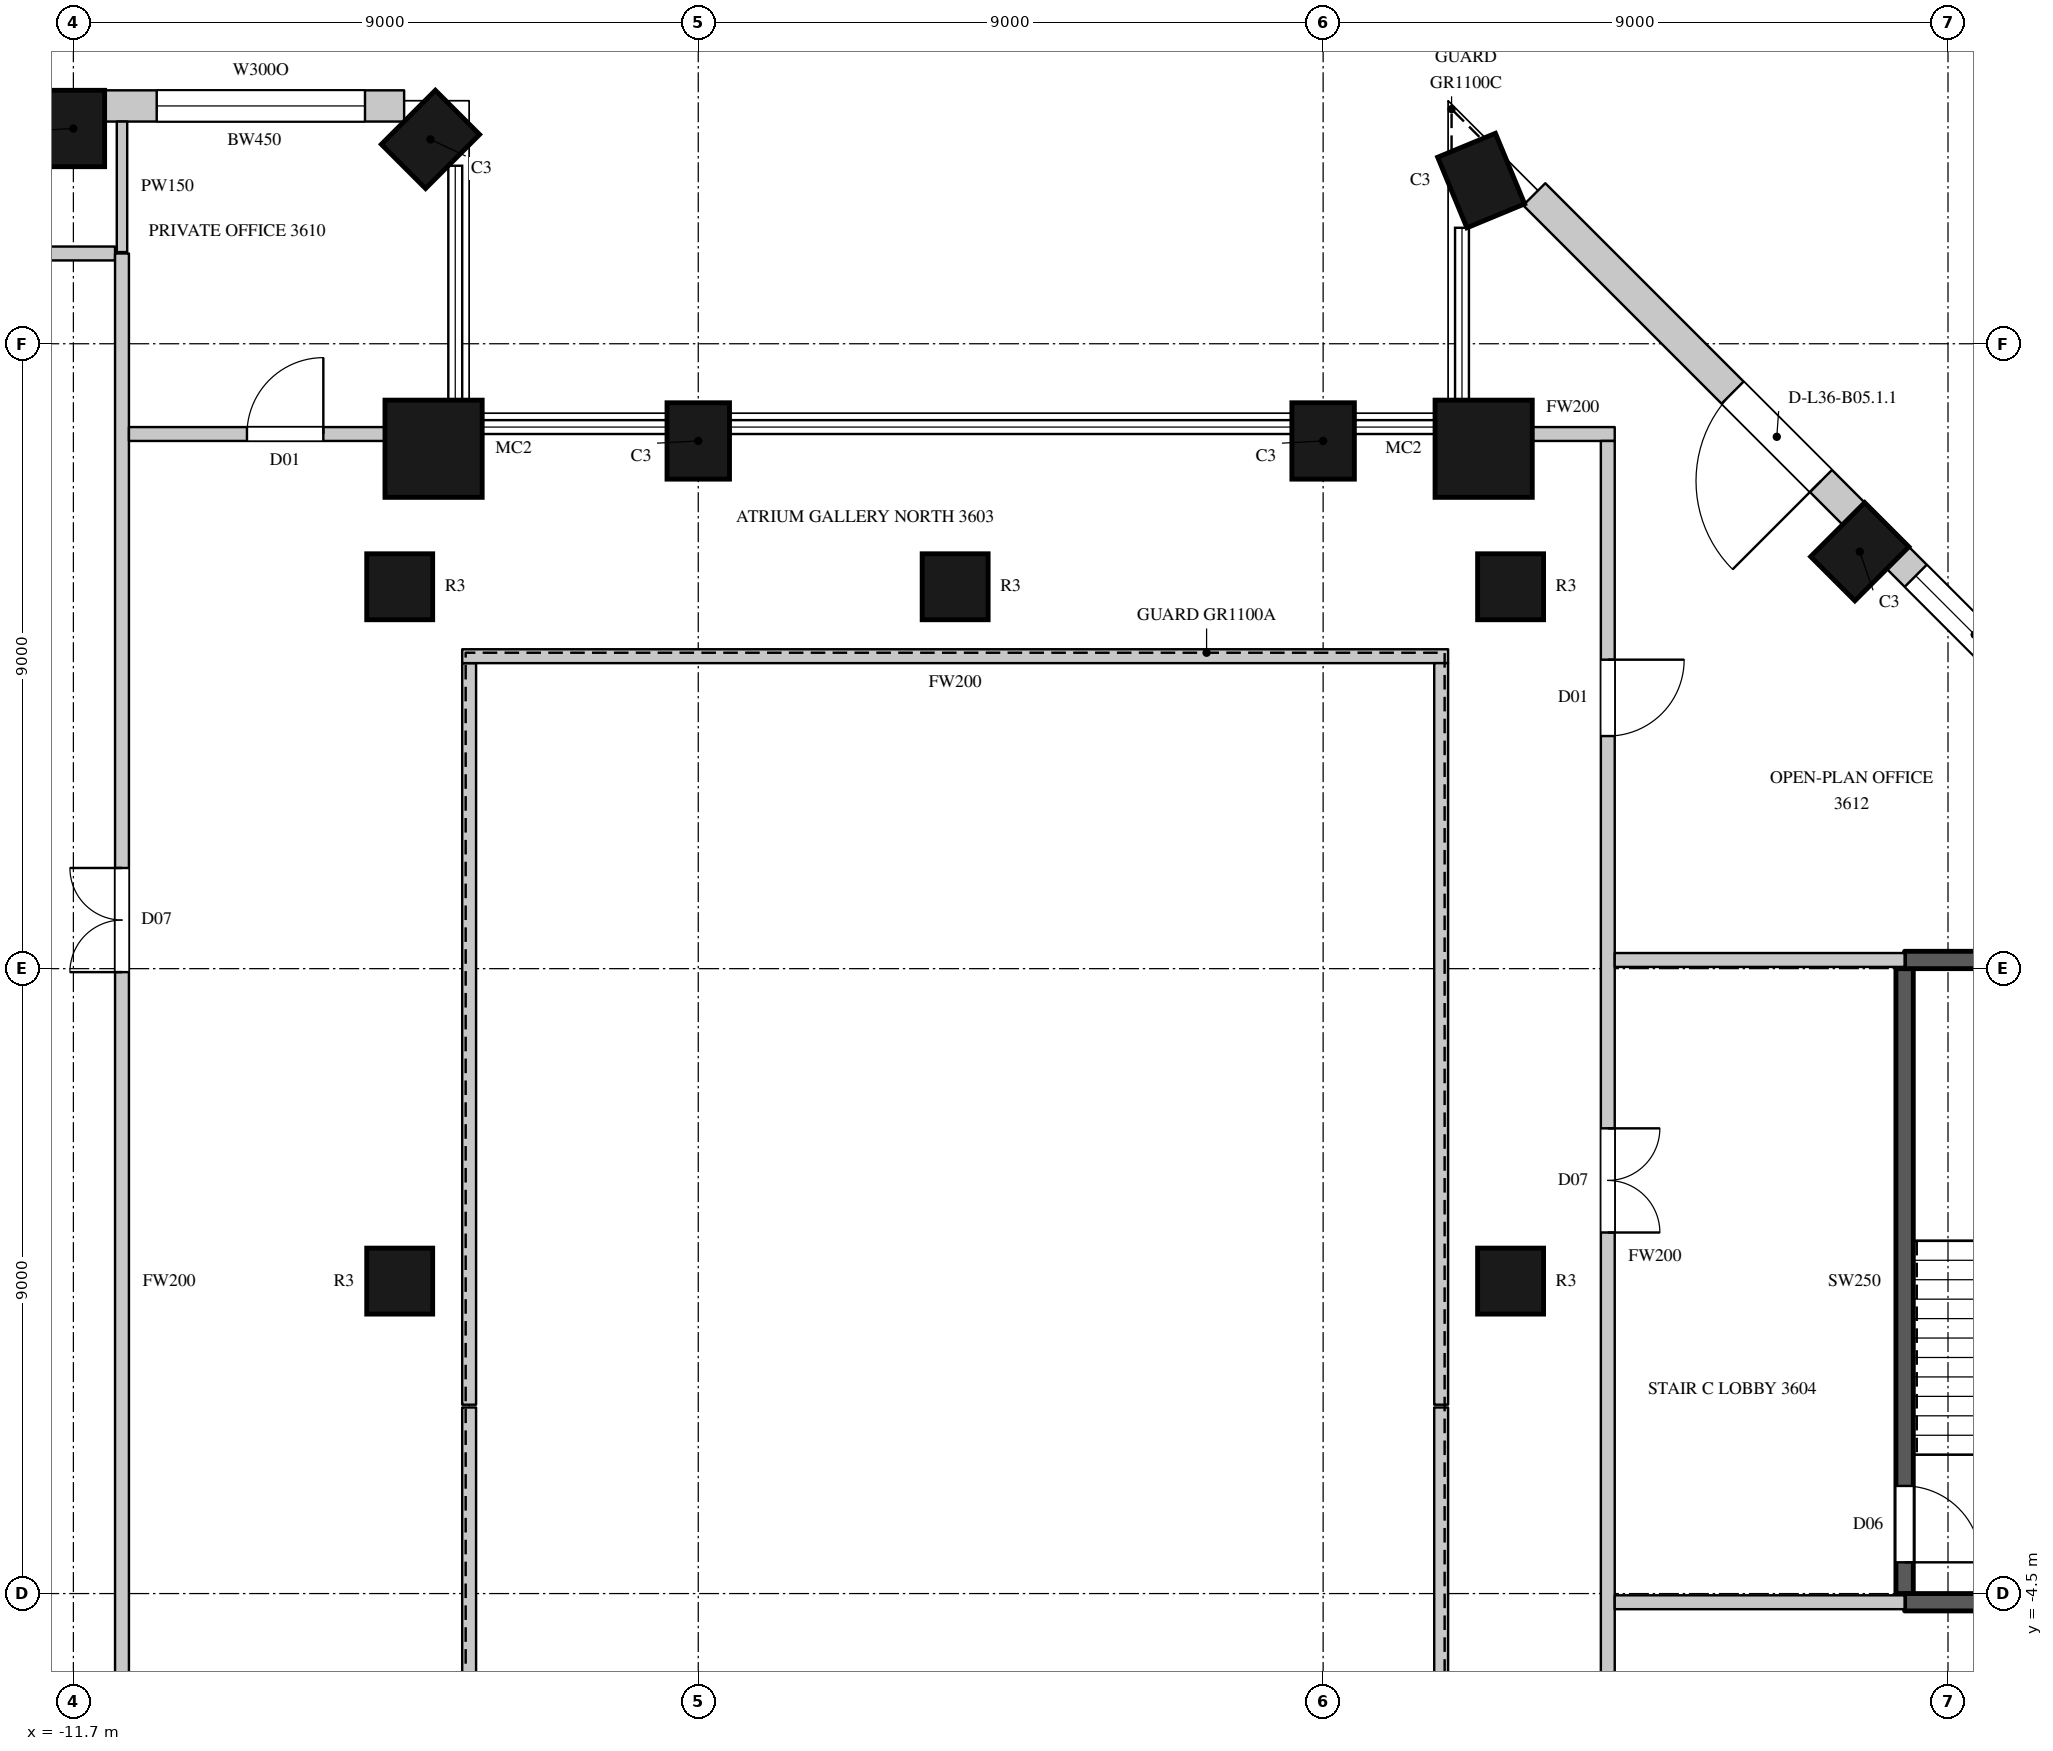
"""IFC4 building model, lengths in metres.
Left out: names, types, materials, properties, quantities, classifications, styles, units other than length and angle.
Written with IfcOpenShell. Run it as: python <this file> out.ifc"""

import sys

from ifc_helpers import new_model, si_unit, direction, frame, frame_2d, origin, origin_2d, place, context, subcontext, project, spatial, rectangle, circle, extrude, element, fill, save


model = new_model("IFC4")
c1 = context("Model", 3, precision=1e-05, world=origin(), true_north=direction((0.0, 1.0)))
c2 = subcontext(c1, "Body", "Model", "MODEL_VIEW")
j1 = project(units=[si_unit("LENGTHUNIT", "METRE"), si_unit("PLANEANGLEUNIT", "RADIAN")], contexts=[c1])
p1 = place(None, origin())
s1 = spatial("IfcSite", under=j1, at=p1, CompositionType="ELEMENT")
p2 = place(p1, origin())
s2 = spatial("IfcBuilding", under=s1, at=p2, CompositionType="ELEMENT")
p3 = place(p2, frame((0.0, 0.0, 168.7)))
s3 = spatial("IfcBuildingStorey", under=s2, at=p3, CompositionType="ELEMENT", Elevation=168.7)
for number, where, z_axis, x_axis in (
    (1, (14.029, 10.505, 0.0), (0.0, 0.0, 1.0), (-0.707, 0.707, 0.0)),
    (2, (8.576, 15.85, 0.0), (0.0, 0.0, 1.0), (-0.924, -0.383, 0.0)),
):
    element("IfcColumn", number, at=place(p3, frame(where, z_axis=z_axis, x_axis=x_axis)), inside=s3, PredefinedType="COLUMN", context=c2, shape_type="SweptSolid", body=[
        extrude(rectangle(XDim=0.9, YDim=1.1, at=origin_2d()), origin(), (0.0, 0.0, 1.0), 4.1),
    ])
p4 = place(p3, frame((8.612, 11.988, 0.0), z_axis=(0.0, 0.0, 1.0), x_axis=(1.0, 0.0, 0.0)))
e3 = element("IfcColumn", 3, at=p4, inside=s3, PredefinedType="COLUMN", context=c2, shape_type="SweptSolid", body=[
    extrude(circle(Radius=0.7, at=origin_2d()), origin(), (0.0, 0.0, 1.0), 4.1),
])
for number, where, z_axis, x_axis in (
    (4, (6.3, 12.1, 0.0), (0.0, 0.0, 1.0), (-1.0, 0.0, 0.0)),
    (5, (-2.7, 12.1, 0.0), (0.0, 0.0, 1.0), (-1.0, 0.0, 0.0)),
):
    element("IfcColumn", number, at=place(p3, frame(where, z_axis=z_axis, x_axis=x_axis)), inside=s3, PredefinedType="COLUMN", context=c2, shape_type="SweptSolid", body=[
        extrude(rectangle(XDim=0.9, YDim=1.1, at=origin_2d()), origin(), (0.0, 0.0, 1.0), 4.1),
    ])
p5 = place(p3, frame((-6.512, 11.988, 0.0), z_axis=(0.0, 0.0, 1.0), x_axis=(1.0, 0.0, 0.0)))
e6 = element("IfcColumn", 6, at=p5, inside=s3, PredefinedType="COLUMN", context=c2, shape_type="SweptSolid", body=[
    extrude(circle(Radius=0.7, at=origin_2d()), origin(), (0.0, 0.0, 1.0), 4.1),
])
for number, where, z_axis, x_axis in (
    (7, (-6.557, 16.443, 0.0), (0.0, 0.0, 1.0), (-0.707, 0.707, 0.0)),
    (8, (-11.7, 16.6, 0.0), (0.0, 0.0, 1.0), (-1.0, 0.0, 0.0)),
):
    element("IfcColumn", number, at=place(p3, frame(where, z_axis=z_axis, x_axis=x_axis)), inside=s3, PredefinedType="COLUMN", context=c2, shape_type="SweptSolid", body=[
        extrude(rectangle(XDim=0.9, YDim=1.1, at=origin_2d()), origin(), (0.0, 0.0, 1.0), 4.1),
    ])
for number, where, z_axis, x_axis in (
    (9, (-7.0, 0.0, 0.0), (0.0, 0.0, 1.0), (1.0, 0.0, 0.0)),
    (10, (-7.0, 10.0, 0.0), (0.0, 0.0, 1.0), (1.0, 0.0, 0.0)),
    (11, (1.0, 10.0, 0.0), (0.0, 0.0, 1.0), (1.0, 0.0, 0.0)),
    (12, (9.0, 0.0, 0.0), (0.0, 0.0, 1.0), (1.0, 0.0, 0.0)),
    (13, (9.0, 10.0, 0.0), (0.0, 0.0, 1.0), (1.0, 0.0, 0.0)),
):
    element("IfcColumn", number, at=place(p3, frame(where, z_axis=z_axis, x_axis=x_axis)), inside=s3, PredefinedType="COLUMN", context=c2, shape_type="SweptSolid", body=[
        extrude(circle(Radius=0.475, at=origin_2d()), origin(), (0.0, 0.0, 1.0), 4.1),
    ])
p6 = place(p3, frame((19.615, 5.379, 0.0), z_axis=(0.0, 0.0, 1.0), x_axis=(-0.707089646058, 0.7071239159, 0.0)))
e14 = element("IfcWall", 14, at=p6, inside=s3, PredefinedType="SOLIDWALL", context=c2, shape_type="SweptSolid", body=[
    extrude(rectangle(XDim=7.124, YDim=0.45, at=frame_2d((3.562, 0.0))), origin(), (0.0, 0.0, 1.0), 3.8),
])
p7 = place(p6, frame((0.328, 0.0, 1.05)))
e15 = element("IfcOpeningElement", 15, at=p7, cuts=e14, PredefinedType="OPENING", context=c2, shape_type="SweptSolid", body=[
    extrude(rectangle(XDim=2.4, YDim=2.4, at=frame_2d((1.2, 1.2))), frame((0.0, 0.235, 0.0), z_axis=(0.0, -1.0, 0.0), x_axis=(1.0, 0.0, 0.0)), (0.0, 0.0, 1.0), 0.47),
])
p8 = place(p6, frame((4.359, 0.0, 1.05)))
e16 = element("IfcOpeningElement", 16, at=p8, cuts=e14, PredefinedType="OPENING", context=c2, shape_type="SweptSolid", body=[
    extrude(rectangle(XDim=2.4, YDim=2.4, at=frame_2d((1.2, 1.2))), frame((0.0, 0.235, 0.0), z_axis=(0.0, -1.0, 0.0), x_axis=(1.0, 0.0, 0.0)), (0.0, 0.0, 1.0), 0.47),
])
p9 = place(p3, frame((13.941, 11.053, 0.0), z_axis=(0.0, 0.0, 1.0), x_axis=(-0.707106781187, 0.707106781187, 0.0)))
e17 = element("IfcWall", 17, at=p9, inside=s3, PredefinedType="SOLIDWALL", context=c2, shape_type="SweptSolid", body=[
    extrude(rectangle(XDim=6.505, YDim=0.45, at=frame_2d((3.252, 0.0))), origin(), (0.0, 0.0, 1.0), 3.8),
])
p10 = place(p9, frame((0.665, 0.0, 0.0)))
e18 = element("IfcOpeningElement", 18, at=p10, cuts=e17, PredefinedType="OPENING", context=c2, shape_type="SweptSolid", body=[
    extrude(rectangle(XDim=1.8, YDim=2.4, at=frame_2d((0.9, 1.2))), frame((0.0, 0.235, 0.0), z_axis=(0.0, -1.0, 0.0), x_axis=(1.0, 0.0, 0.0)), (0.0, 0.0, 1.0), 0.47),
])
p11 = place(p3, frame((-6.936, 16.925, 0.0), z_axis=(0.0, 0.0, 1.0), x_axis=(-1.0, 0.0, 0.0)))
e19 = element("IfcWall", 19, at=p11, inside=s3, PredefinedType="SOLIDWALL", context=c2, shape_type="SweptSolid", body=[
    extrude(rectangle(XDim=4.314, YDim=0.45, at=frame_2d((2.157, 0.0))), origin(), (0.0, 0.0, 1.0), 3.8),
])
p12 = place(p11, frame((0.564, 0.0, 1.05)))
e20 = element("IfcOpeningElement", 20, at=p12, cuts=e19, PredefinedType="OPENING", context=c2, shape_type="SweptSolid", body=[
    extrude(rectangle(XDim=3.0, YDim=2.4, at=frame_2d((1.5, 1.2))), frame((0.0, 0.235, 0.0), z_axis=(0.0, -1.0, 0.0), x_axis=(1.0, 0.0, 0.0)), (0.0, 0.0, 1.0), 0.47),
])
p13 = place(p3, frame((16.206, 10.308, 0.0), z_axis=(0.0, 0.0, 1.0), x_axis=(-0.707057827829, 0.707155731156, 0.0)))
e21 = element("IfcWall", 21, at=p13, inside=s3, PredefinedType="SOLIDWALL", context=c2, shape_type="SweptSolid", body=[
    extrude(rectangle(XDim=2.494, YDim=0.45, at=frame_2d((1.247, 0.0))), origin(), (0.0, 0.0, 1.0), 0.6),
])
p14 = place(p3, frame((12.251, 14.263, 0.0), z_axis=(0.0, 0.0, 1.0), x_axis=(-0.707039709166, 0.707173846846, 0.0)))
e22 = element("IfcWall", 22, at=p14, inside=s3, PredefinedType="SOLIDWALL", context=c2, shape_type="SweptSolid", body=[
    extrude(rectangle(XDim=1.82, YDim=0.45, at=frame_2d((0.91, 0.0))), origin(), (0.0, 0.0, 1.0), 0.6),
])
p15 = place(p3, frame((-13.97, 14.8, 0.0), z_axis=(0.0, 0.0, 1.0), x_axis=(1.0, 0.0, 0.0)))
e23 = element("IfcWall", 23, at=p15, inside=s3, PredefinedType="PARTITIONING", context=c2, shape_type="SweptSolid", body=[
    extrude(rectangle(XDim=2.87, YDim=0.2, at=frame_2d((1.435, 0.0))), origin(), (0.0, 0.0, 1.0), 3.8),
])
p16 = place(p3, frame((-11.0, -14.8, 0.0), z_axis=(0.0, 0.0, 1.0), x_axis=(0.0, 1.0, 0.0)))
e24 = element("IfcWall", 24, at=p16, inside=s3, PredefinedType="PARTITIONING", context=c2, shape_type="SweptSolid", body=[
    extrude(rectangle(XDim=29.6, YDim=0.2, at=frame_2d((14.8, 0.0))), origin(), (0.0, 0.0, 1.0), 3.8),
])
p17 = place(p16, frame((19.25, 0.0, 0.0)))
e25 = element("IfcOpeningElement", 25, at=p17, cuts=e24, PredefinedType="OPENING", context=c2, shape_type="SweptSolid", body=[
    extrude(rectangle(XDim=1.5, YDim=2.4, at=frame_2d((0.75, 1.2))), frame((0.0, 0.11, 0.0), z_axis=(0.0, -1.0, 0.0), x_axis=(1.0, 0.0, 0.0)), (0.0, 0.0, 1.0), 0.22),
])
p18 = place(p3, frame((-10.9, 12.2, 0.0), z_axis=(0.0, 0.0, 1.0), x_axis=(1.0, 0.0, 0.0)))
e26 = element("IfcWall", 26, at=p18, inside=s3, PredefinedType="PARTITIONING", context=c2, shape_type="SweptSolid", body=[
    extrude(rectangle(XDim=3.704, YDim=0.2, at=frame_2d((1.852, 0.0))), origin(), (0.0, 0.0, 1.0), 3.8),
])
p19 = place(p18, frame((1.7, 0.0, 0.0)))
e27 = element("IfcOpeningElement", 27, at=p19, cuts=e26, PredefinedType="OPENING", context=c2, shape_type="SweptSolid", body=[
    extrude(rectangle(XDim=1.1, YDim=2.4, at=frame_2d((0.55, 1.2))), frame((0.0, 0.11, 0.0), z_axis=(0.0, -1.0, 0.0), x_axis=(1.0, 0.0, 0.0)), (0.0, 0.0, 1.0), 0.22),
])
p20 = place(p3, frame((-6.0, -8.9, 0.0), z_axis=(0.0, 0.0, 1.0), x_axis=(0.0, 1.0, 0.0)))
e28 = element("IfcWall", 28, at=p20, inside=s3, PredefinedType="PARTITIONING", context=c2, shape_type="SweptSolid", body=[
    extrude(rectangle(XDim=7.08, YDim=0.2, at=frame_2d((3.54, 0.0))), origin(), (0.0, 0.0, 1.0), 3.8),
])
p21 = place(p3, frame((-6.0, -1.78, 0.0), z_axis=(0.0, 0.0, 1.0), x_axis=(0.0, 1.0, 0.0)))
e29 = element("IfcWall", 29, at=p21, inside=s3, PredefinedType="PARTITIONING", context=c2, shape_type="SweptSolid", body=[
    extrude(rectangle(XDim=10.68, YDim=0.2, at=frame_2d((5.34, 0.0))), origin(), (0.0, 0.0, 1.0), 3.8),
])
p22 = place(p3, frame((-6.1, 9.0, 0.0), z_axis=(0.0, 0.0, 1.0), x_axis=(1.0, 0.0, 0.0)))
e30 = element("IfcWall", 30, at=p22, inside=s3, PredefinedType="PARTITIONING", context=c2, shape_type="SweptSolid", body=[
    extrude(rectangle(XDim=14.2, YDim=0.2, at=frame_2d((7.1, 0.0))), origin(), (0.0, 0.0, 1.0), 3.8),
])
p23 = place(p3, frame((8.0, -8.9, 0.0), z_axis=(0.0, 0.0, 1.0), x_axis=(0.0, 1.0, 0.0)))
e31 = element("IfcWall", 31, at=p23, inside=s3, PredefinedType="PARTITIONING", context=c2, shape_type="SweptSolid", body=[
    extrude(rectangle(XDim=7.08, YDim=0.2, at=frame_2d((3.54, 0.0))), origin(), (0.0, 0.0, 1.0), 3.8),
])
p24 = place(p3, frame((8.0, -1.78, 0.0), z_axis=(0.0, 0.0, 1.0), x_axis=(0.0, 1.0, 0.0)))
e32 = element("IfcWall", 32, at=p24, inside=s3, PredefinedType="PARTITIONING", context=c2, shape_type="SweptSolid", body=[
    extrude(rectangle(XDim=10.68, YDim=0.2, at=frame_2d((5.34, 0.0))), origin(), (0.0, 0.0, 1.0), 3.8),
])
p25 = place(p3, frame((9.296, 12.2, 0.0), z_axis=(0.0, 0.0, 1.0), x_axis=(1.0, 0.0, 0.0)))
e33 = element("IfcWall", 33, at=p25, inside=s3, PredefinedType="PARTITIONING", context=c2, shape_type="SweptSolid", body=[
    extrude(rectangle(XDim=1.204, YDim=0.2, at=frame_2d((0.602, 0.0))), origin(), (0.0, 0.0, 1.0), 3.8),
])
p26 = place(p3, frame((10.4, -11.4, 0.0), z_axis=(0.0, 0.0, 1.0), x_axis=(0.0, 1.0, 0.0)))
e34 = element("IfcWall", 34, at=p26, inside=s3, PredefinedType="PARTITIONING", context=c2, shape_type="SweptSolid", body=[
    extrude(rectangle(XDim=23.5, YDim=0.2, at=frame_2d((11.75, 0.0))), origin(), (0.0, 0.0, 1.0), 3.8),
])
p27 = place(p26, frame((12.1, 0.0, 0.0)))
e35 = element("IfcOpeningElement", 35, at=p27, cuts=e34, PredefinedType="OPENING", context=c2, shape_type="SweptSolid", body=[
    extrude(rectangle(XDim=1.5, YDim=2.4, at=frame_2d((0.75, 1.2))), frame((0.0, 0.11, 0.0), z_axis=(0.0, -1.0, 0.0), x_axis=(1.0, 0.0, 0.0)), (0.0, 0.0, 1.0), 0.22),
])
p28 = place(p26, frame((19.25, 0.0, 0.0)))
e36 = element("IfcOpeningElement", 36, at=p28, cuts=e34, PredefinedType="OPENING", context=c2, shape_type="SweptSolid", body=[
    extrude(rectangle(XDim=1.1, YDim=2.4, at=frame_2d((0.55, 1.2))), frame((0.0, 0.11, 0.0), z_axis=(0.0, -1.0, 0.0), x_axis=(1.0, 0.0, 0.0)), (0.0, 0.0, 1.0), 0.22),
])
p29 = place(p26, frame((4.45, 0.0, 0.0)))
e37 = element("IfcOpeningElement", 37, at=p29, cuts=e34, PredefinedType="OPENING", context=c2, shape_type="SweptSolid", body=[
    extrude(rectangle(XDim=1.1, YDim=2.4, at=frame_2d((0.55, 1.2))), frame((0.0, 0.11, 0.0), z_axis=(0.0, -1.0, 0.0), x_axis=(1.0, 0.0, 0.0)), (0.0, 0.0, 1.0), 0.22),
])
for number, where, z_axis, x_axis in (
    (38, (10.5, -4.625, 0.0), (0.0, 0.0, 1.0), (1.0, 0.0, 0.0)),
    (39, (10.5, 4.625, 0.0), (0.0, 0.0, 1.0), (1.0, 0.0, 0.0)),
):
    element("IfcWall", number, at=place(p3, frame(where, z_axis=z_axis, x_axis=x_axis)), inside=s3, PredefinedType="PARTITIONING", context=c2, shape_type="SweptSolid", body=[
        extrude(rectangle(XDim=4.175, YDim=0.2, at=frame_2d((2.087, 0.0))), origin(), (0.0, 0.0, 1.0), 3.8),
    ])
p30 = place(p3, frame((-11.0, 14.82, 0.0), z_axis=(0.0, 0.0, 1.0), x_axis=(0.0, 1.0, 0.0)))
e40 = element("IfcWall", 40, at=p30, inside=s3, PredefinedType="PARTITIONING", context=c2, shape_type="SweptSolid", body=[
    extrude(rectangle(XDim=1.88, YDim=0.15, at=frame_2d((0.94, 0.0))), origin(), (0.0, 0.0, 1.0), 3.8),
])
p31 = place(p3, frame((14.675, -4.5, 0.0), z_axis=(0.0, 0.0, 1.0), x_axis=(0.0, 1.0, 0.0)))
e41 = element("IfcWall", 41, at=p31, inside=s3, PredefinedType="SHEAR", context=c2, shape_type="SweptSolid", body=[
    extrude(rectangle(XDim=9.0, YDim=0.25, at=frame_2d((4.5, 0.0))), origin(), (0.0, 0.0, 1.0), 3.8),
])
p32 = place(p31, frame((0.45, 0.0, 0.0)))
e42 = element("IfcOpeningElement", 42, at=p32, cuts=e41, PredefinedType="OPENING", context=c2, shape_type="SweptSolid", body=[
    extrude(rectangle(XDim=1.1, YDim=2.2, at=frame_2d((0.55, 1.1))), frame((0.0, 0.135, 0.0), z_axis=(0.0, -1.0, 0.0), x_axis=(1.0, 0.0, 0.0)), (0.0, 0.0, 1.0), 0.27),
])
p33 = place(p3, frame((14.675, -4.625, 0.0), z_axis=(0.0, 0.0, 1.0), x_axis=(1.0, 0.0, 0.0)))
e43 = element("IfcWall", 43, at=p33, inside=s3, PredefinedType="SHEAR", context=c2, shape_type="SweptSolid", body=[
    extrude(rectangle(XDim=4.45, YDim=0.25, at=frame_2d((2.225, 0.0))), origin(), (0.0, 0.0, 1.0), 3.8),
])
p34 = place(p3, frame((14.675, 4.625, 0.0), z_axis=(0.0, 0.0, 1.0), x_axis=(1.0, 0.0, 0.0)))
e44 = element("IfcWall", 44, at=p34, inside=s3, PredefinedType="SHEAR", context=c2, shape_type="SweptSolid", body=[
    extrude(rectangle(XDim=4.324, YDim=0.25, at=frame_2d((2.162, 0.0))), origin(), (0.0, 0.0, 1.0), 3.8),
])
p35 = place(p8, origin())
e45 = element("IfcWindow", 45, at=p35, inside=s3, PartitioningType="SINGLE_PANEL", PredefinedType="WINDOW", context=c2, shape_type="SweptSolid", body=[
    extrude(rectangle(XDim=2.4, YDim=2.4, at=frame_2d((1.2, 1.2))), frame((0.0, 0.135, 0.0), z_axis=(0.0, -1.0, 0.0), x_axis=(1.0, 0.0, 0.0)), (0.0, 0.0, 1.0), 0.06),
])
fill(e16, e45)
p36 = place(p10, origin())
e46 = element("IfcDoor", 46, at=p36, inside=s3, OperationType="SLIDING_TO_LEFT", PredefinedType="DOOR", context=c2, shape_type="SweptSolid", body=[
    extrude(rectangle(XDim=1.8, YDim=2.4, at=frame_2d((0.9, 1.2))), frame((0.0, 0.13, 0.0), z_axis=(0.0, -1.0, 0.0), x_axis=(1.0, 0.0, 0.0)), (0.0, 0.0, 1.0), 0.05),
])
fill(e18, e46)
p37 = place(p12, origin())
e47 = element("IfcWindow", 47, at=p37, inside=s3, PartitioningType="SINGLE_PANEL", PredefinedType="WINDOW", context=c2, shape_type="SweptSolid", body=[
    extrude(rectangle(XDim=3.0, YDim=2.4, at=frame_2d((1.5, 1.2))), frame((0.0, 0.135, 0.0), z_axis=(0.0, -1.0, 0.0), x_axis=(1.0, 0.0, 0.0)), (0.0, 0.0, 1.0), 0.06),
])
fill(e20, e47)
p38 = place(p17, origin())
e48 = element("IfcDoor", 48, at=p38, inside=s3, OperationType="DOUBLE_DOOR_SINGLE_SWING", PredefinedType="DOOR", context=c2, shape_type="SweptSolid", body=[
    extrude(rectangle(XDim=1.5, YDim=2.4, at=frame_2d((0.75, 1.2))), frame((0.0, 0.025, 0.0), z_axis=(0.0, -1.0, 0.0), x_axis=(1.0, 0.0, 0.0)), (0.0, 0.0, 1.0), 0.05),
])
fill(e25, e48)
p39 = place(p27, origin())
e49 = element("IfcDoor", 49, at=p39, inside=s3, OperationType="DOUBLE_DOOR_SINGLE_SWING", PredefinedType="DOOR", context=c2, shape_type="SweptSolid", body=[
    extrude(rectangle(XDim=1.5, YDim=2.4, at=frame_2d((0.75, 1.2))), frame((0.0, 0.025, 0.0), z_axis=(0.0, -1.0, 0.0), x_axis=(1.0, 0.0, 0.0)), (0.0, 0.0, 1.0), 0.05),
])
fill(e35, e49)
p40 = place(p19, origin())
e50 = element("IfcDoor", 50, at=p40, inside=s3, OperationType="SINGLE_SWING_RIGHT", PredefinedType="DOOR", context=c2, shape_type="SweptSolid", body=[
    extrude(rectangle(XDim=1.1, YDim=2.4, at=frame_2d((0.55, 1.2))), frame((0.0, 0.025, 0.0), z_axis=(0.0, -1.0, 0.0), x_axis=(1.0, 0.0, 0.0)), (0.0, 0.0, 1.0), 0.05),
])
fill(e27, e50)
p41 = place(p28, origin())
e51 = element("IfcDoor", 51, at=p41, inside=s3, OperationType="SINGLE_SWING_LEFT", PredefinedType="DOOR", context=c2, shape_type="SweptSolid", body=[
    extrude(rectangle(XDim=1.1, YDim=2.4, at=frame_2d((0.55, 1.2))), frame((0.0, 0.025, 0.0), z_axis=(0.0, -1.0, 0.0), x_axis=(1.0, 0.0, 0.0)), (0.0, 0.0, 1.0), 0.05),
])
fill(e36, e51)
p42 = place(p32, origin())
e52 = element("IfcDoor", 52, at=p42, inside=s3, OperationType="SINGLE_SWING_RIGHT", PredefinedType="DOOR", context=c2, shape_type="SweptSolid", body=[
    extrude(rectangle(XDim=1.1, YDim=2.2, at=frame_2d((0.55, 1.1))), frame((0.0, 0.025, 0.0), z_axis=(0.0, -1.0, 0.0), x_axis=(1.0, 0.0, 0.0)), (0.0, 0.0, 1.0), 0.05),
])
fill(e42, e52)
save(model, sys.argv[1])
